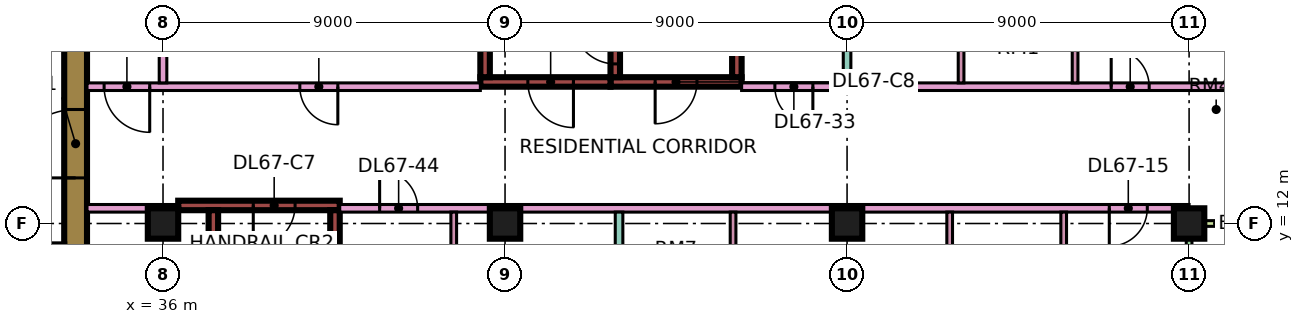
"""IFC4 building model, lengths in metres.
Left out: names, types, materials, properties, quantities, classifications, styles, units other than length and angle.
Written with IfcOpenShell. Run it as: python <this file> out.ifc"""

import sys

from ifc_helpers import new_model, si_unit, direction, frame, frame_2d, origin, origin_2d, place, context, subcontext, project, spatial, rectangle, extrude, element, fill, save


model = new_model("IFC4")
c1 = context("Model", 3, precision=1e-05, world=origin(), true_north=direction((0.0, 1.0)))
c2 = subcontext(c1, "Body", "Model", "MODEL_VIEW")
j1 = project(units=[si_unit("LENGTHUNIT", "METRE"), si_unit("PLANEANGLEUNIT", "RADIAN")], contexts=[c1])
p1 = place(None, origin())
s1 = spatial("IfcSite", under=j1, at=p1, CompositionType="ELEMENT")
p2 = place(p1, origin())
s2 = spatial("IfcBuilding", under=s1, at=p2, CompositionType="ELEMENT")
p3 = place(p2, frame((0.0, 0.0, 288.4)))
s3 = spatial("IfcBuildingStorey", under=s2, at=p3, CompositionType="ELEMENT", Elevation=288.4)
for number, where, z_axis, x_axis in (
    (1, (36.0, 12.0, 0.0), (0.0, 0.0, 1.0), (1.0, 0.0, 0.0)),
    (2, (45.0, 12.0, 0.0), (0.0, 0.0, 1.0), (1.0, 0.0, 0.0)),
    (3, (54.0, 12.0, 0.0), (0.0, 0.0, 1.0), (1.0, 0.0, 0.0)),
    (4, (63.0, 12.0, 0.0), (0.0, 0.0, 1.0), (1.0, 0.0, 0.0)),
):
    element("IfcColumn", number, at=place(p3, frame(where, z_axis=z_axis, x_axis=x_axis)), inside=s3, PredefinedType="COLUMN", context=c2, shape_type="SweptSolid", body=[
        extrude(rectangle(XDim=0.8, YDim=0.8, at=origin_2d()), origin(), (0.0, 0.0, 1.0), 3.75),
    ])
p4 = place(p3, frame((33.7, 7.6, 0.0), z_axis=(0.0, 0.0, 1.0), x_axis=(0.0, 1.0, 0.0)))
e5 = element("IfcWall", 5, at=p4, inside=s3, PredefinedType="SHEAR", context=c2, shape_type="SweptSolid", body=[
    extrude(rectangle(XDim=11.8, YDim=0.6, at=frame_2d((5.9, 0.0))), origin(), (0.0, 0.0, 1.0), 3.75),
])
p5 = place(p4, frame((5.6, 0.0, 0.0)))
e6 = element("IfcOpeningElement", 6, at=p5, cuts=e5, PredefinedType="OPENING", context=c2, shape_type="SweptSolid", body=[
    extrude(rectangle(XDim=1.8, YDim=2.4, at=frame_2d((0.9, 1.2))), frame((0.0, 0.31, 0.0), z_axis=(0.0, -1.0, 0.0), x_axis=(1.0, 0.0, 0.0)), (0.0, 0.0, 1.0), 0.62),
])
p6 = place(p3, frame((36.4, 12.475, 0.0), z_axis=(0.0, 0.0, 1.0), x_axis=(1.0, 0.0, 0.0)))
e7 = element("IfcWall", 7, at=p6, inside=s3, PredefinedType="SHEAR", context=c2, shape_type="SweptSolid", body=[
    extrude(rectangle(XDim=4.25, YDim=0.25, at=frame_2d((2.125, 0.0))), origin(), (0.0, 0.0, 1.0), 3.75),
])
p7 = place(p6, frame((1.975, 0.0, 0.0)))
e8 = element("IfcOpeningElement", 8, at=p7, cuts=e7, PredefinedType="OPENING", context=c2, shape_type="SweptSolid", body=[
    extrude(rectangle(XDim=1.1, YDim=2.2, at=frame_2d((0.55, 1.1))), frame((0.0, 0.135, 0.0), z_axis=(0.0, -1.0, 0.0), x_axis=(1.0, 0.0, 0.0)), (0.0, 0.0, 1.0), 0.27),
])
for number, where, z_axis, x_axis in (
    (9, (37.325, 5.85, 0.0), (0.0, 0.0, 1.0), (0.0, 1.0, 0.0)),
    (10, (40.525, 5.85, 0.0), (0.0, 0.0, 1.0), (0.0, 1.0, 0.0)),
):
    element("IfcWall", number, at=place(p3, frame(where, z_axis=z_axis, x_axis=x_axis)), inside=s3, PredefinedType="SHEAR", context=c2, shape_type="SweptSolid", body=[
        extrude(rectangle(XDim=6.5, YDim=0.25, at=frame_2d((3.25, 0.0))), origin(), (0.0, 0.0, 1.0), 3.75),
    ])
p8 = place(p3, frame((47.775, 15.725, 0.0), z_axis=(0.0, 0.0, 1.0), x_axis=(1.0, 0.0, 0.0)))
e11 = element("IfcWall", 11, at=p8, inside=s3, PredefinedType="SHEAR", context=c2, shape_type="SweptSolid", body=[
    extrude(rectangle(XDim=3.45, YDim=0.25, at=frame_2d((1.725, 0.0))), origin(), (0.0, 0.0, 1.0), 3.75),
])
p9 = place(p8, frame((1.175, 0.0, 0.0)))
e12 = element("IfcOpeningElement", 12, at=p9, cuts=e11, PredefinedType="OPENING", context=c2, shape_type="SweptSolid", body=[
    extrude(rectangle(XDim=1.1, YDim=2.2, at=frame_2d((0.55, 1.1))), frame((0.0, 0.135, 0.0), z_axis=(0.0, -1.0, 0.0), x_axis=(1.0, 0.0, 0.0)), (0.0, 0.0, 1.0), 0.27),
])
p10 = place(p3, frame((47.9, 15.85, 0.0), z_axis=(0.0, 0.0, 1.0), x_axis=(0.0, 1.0, 0.0)))
e13 = element("IfcWall", 13, at=p10, inside=s3, PredefinedType="SHEAR", context=c2, shape_type="SweptSolid", body=[
    extrude(rectangle(XDim=6.5, YDim=0.25, at=frame_2d((3.25, 0.0))), origin(), (0.0, 0.0, 1.0), 3.75),
])
p11 = place(p10, frame((0.35, 0.0, 0.0)))
e14 = element("IfcOpeningElement", 14, at=p11, cuts=e13, PredefinedType="OPENING", context=c2, shape_type="SweptSolid", body=[
    extrude(rectangle(XDim=1.1, YDim=2.2, at=frame_2d((0.55, 1.1))), frame((0.0, 0.135, 0.0), z_axis=(0.0, -1.0, 0.0), x_axis=(1.0, 0.0, 0.0)), (0.0, 0.0, 1.0), 0.27),
])
p12 = place(p3, frame((51.1, 15.85, 0.0), z_axis=(0.0, 0.0, 1.0), x_axis=(0.0, 1.0, 0.0)))
e15 = element("IfcWall", 15, at=p12, inside=s3, PredefinedType="SHEAR", context=c2, shape_type="SweptSolid", body=[
    extrude(rectangle(XDim=6.5, YDim=0.25, at=frame_2d((3.25, 0.0))), origin(), (0.0, 0.0, 1.0), 3.75),
])
p13 = place(p3, frame((44.35, 15.725, 0.0), z_axis=(0.0, 0.0, 1.0), x_axis=(1.0, 0.0, 0.0)))
e16 = element("IfcWall", 16, at=p13, inside=s3, PredefinedType="SHEAR", context=c2, shape_type="SweptSolid", body=[
    extrude(rectangle(XDim=3.425, YDim=0.25, at=frame_2d((1.712, 0.0))), origin(), (0.0, 0.0, 1.0), 3.75),
])
p14 = place(p13, frame((1.25, 0.0, 0.0)))
e17 = element("IfcOpeningElement", 17, at=p14, cuts=e16, PredefinedType="OPENING", context=c2, shape_type="SweptSolid", body=[
    extrude(rectangle(XDim=1.2, YDim=2.2, at=frame_2d((0.6, 1.1))), frame((0.0, 0.135, 0.0), z_axis=(0.0, -1.0, 0.0), x_axis=(1.0, 0.0, 0.0)), (0.0, 0.0, 1.0), 0.27),
])
p15 = place(p3, frame((44.475, 15.85, 0.0), z_axis=(0.0, 0.0, 1.0), x_axis=(0.0, 1.0, 0.0)))
e18 = element("IfcWall", 18, at=p15, inside=s3, PredefinedType="SHEAR", context=c2, shape_type="SweptSolid", body=[
    extrude(rectangle(XDim=6.5, YDim=0.25, at=frame_2d((3.25, 0.0))), origin(), (0.0, 0.0, 1.0), 3.75),
])
p16 = place(p15, frame((1.75, 0.0, 0.0)))
e19 = element("IfcOpeningElement", 19, at=p16, cuts=e18, PredefinedType="OPENING", context=c2, shape_type="SweptSolid", body=[
    extrude(rectangle(XDim=1.1, YDim=2.2, at=frame_2d((0.55, 1.1))), frame((0.0, 0.135, 0.0), z_axis=(0.0, -1.0, 0.0), x_axis=(1.0, 0.0, 0.0)), (0.0, 0.0, 1.0), 0.27),
])
p17 = place(p15, frame((4.3, 0.0, 0.0)))
e20 = element("IfcOpeningElement", 20, at=p17, cuts=e18, PredefinedType="OPENING", context=c2, shape_type="SweptSolid", body=[
    extrude(rectangle(XDim=1.1, YDim=2.2, at=frame_2d((0.55, 1.1))), frame((0.0, 0.135, 0.0), z_axis=(0.0, -1.0, 0.0), x_axis=(1.0, 0.0, 0.0)), (0.0, 0.0, 1.0), 0.27),
])
p18 = place(p3, frame((63.0, 1.575, 0.0), z_axis=(0.0, 0.0, 1.0), x_axis=(0.0, 1.0, 0.0)))
e21 = element("IfcWall", 21, at=p18, inside=s3, PredefinedType="SOLIDWALL", context=c2, shape_type="SweptSolid", body=[
    extrude(rectangle(XDim=10.35, YDim=0.15, at=frame_2d((5.175, 0.0))), origin(), (0.0, 0.0, 1.0), 3.35),
])
p19 = place(p18, frame((1.812, 0.0, 0.0)))
e22 = element("IfcOpeningElement", 22, at=p19, cuts=e21, PredefinedType="OPENING", context=c2, shape_type="SweptSolid", body=[
    extrude(rectangle(XDim=1.8, YDim=2.4, at=frame_2d((0.9, 1.2))), frame((0.0, 0.085, 0.0), z_axis=(0.0, -1.0, 0.0), x_axis=(1.0, 0.0, 0.0)), (0.0, 0.0, 1.0), 0.17),
])
p20 = place(p18, frame((6.175, 0.0, 0.45)))
e23 = element("IfcOpeningElement", 23, at=p20, cuts=e21, PredefinedType="OPENING", context=c2, shape_type="SweptSolid", body=[
    extrude(rectangle(XDim=3.0, YDim=2.4, at=frame_2d((1.5, 1.2))), frame((0.0, 0.085, 0.0), z_axis=(0.0, -1.0, 0.0), x_axis=(1.0, 0.0, 0.0)), (0.0, 0.0, 1.0), 0.17),
])
p21 = place(p3, frame((64.5, 12.0, 0.0), z_axis=(0.0, 0.0, 1.0), x_axis=(-1.0, 0.0, 0.0)))
e24 = element("IfcWall", 24, at=p21, inside=s3, PredefinedType="SOLIDWALL", context=c2, shape_type="SweptSolid", body=[
    extrude(rectangle(XDim=1.5, YDim=0.15, at=frame_2d((0.75, 0.0))), origin(), (0.0, 0.0, 1.0), 3.35),
])
p22 = place(p3, frame((34.0, 12.4, 0.0), z_axis=(0.0, 0.0, 1.0), x_axis=(1.0, 0.0, 0.0)))
e25 = element("IfcWall", 25, at=p22, inside=s3, PredefinedType="PARTITIONING", context=c2, shape_type="SweptSolid", body=[
    extrude(rectangle(XDim=2.401, YDim=0.2, at=frame_2d((1.2, 0.0))), origin(), (0.0, 0.0, 1.0), 3.35),
])
p23 = place(p3, frame((34.0, 15.6, 0.0), z_axis=(0.0, 0.0, 1.0), x_axis=(1.0, 0.0, 0.0)))
e26 = element("IfcWall", 26, at=p23, inside=s3, PredefinedType="PARTITIONING", context=c2, shape_type="SweptSolid", body=[
    extrude(rectangle(XDim=10.35, YDim=0.2, at=frame_2d((5.175, 0.0))), origin(), (0.0, 0.0, 1.0), 3.35),
])
p24 = place(p23, frame((5.6, 0.0, 0.0)))
e27 = element("IfcOpeningElement", 27, at=p24, cuts=e26, PredefinedType="OPENING", context=c2, shape_type="SweptSolid", body=[
    extrude(rectangle(XDim=1.0, YDim=2.1, at=frame_2d((0.5, 1.05))), frame((0.0, 0.11, 0.0), z_axis=(0.0, -1.0, 0.0), x_axis=(1.0, 0.0, 0.0)), (0.0, 0.0, 1.0), 0.22),
])
p25 = place(p23, frame((0.45, 0.0, 0.0)))
e28 = element("IfcOpeningElement", 28, at=p25, cuts=e26, PredefinedType="OPENING", context=c2, shape_type="SweptSolid", body=[
    extrude(rectangle(XDim=1.2, YDim=2.1, at=frame_2d((0.6, 1.05))), frame((0.0, 0.11, 0.0), z_axis=(0.0, -1.0, 0.0), x_axis=(1.0, 0.0, 0.0)), (0.0, 0.0, 1.0), 0.22),
])
p26 = place(p3, frame((36.0, 15.7, 0.0), z_axis=(0.0, 0.0, 1.0), x_axis=(0.0, 1.0, 0.0)))
e29 = element("IfcWall", 29, at=p26, inside=s3, PredefinedType="PARTITIONING", context=c2, shape_type="SweptSolid", body=[
    extrude(rectangle(XDim=8.3, YDim=0.2, at=frame_2d((4.15, 0.0))), origin(), (0.0, 0.0, 1.0), 3.35),
])
p27 = place(p3, frame((40.65, 12.4, 0.0), z_axis=(0.0, 0.0, 1.0), x_axis=(1.0, 0.0, 0.0)))
e30 = element("IfcWall", 30, at=p27, inside=s3, PredefinedType="PARTITIONING", context=c2, shape_type="SweptSolid", body=[
    extrude(rectangle(XDim=22.35, YDim=0.2, at=frame_2d((11.175, 0.0))), origin(), (0.0, 0.0, 1.0), 3.35),
])
p28 = place(p27, frame((20.25, 0.0, 0.0)))
e31 = element("IfcOpeningElement", 31, at=p28, cuts=e30, PredefinedType="OPENING", context=c2, shape_type="SweptSolid", body=[
    extrude(rectangle(XDim=1.0, YDim=2.1, at=frame_2d((0.5, 1.05))), frame((0.0, 0.11, 0.0), z_axis=(0.0, -1.0, 0.0), x_axis=(1.0, 0.0, 0.0)), (0.0, 0.0, 1.0), 0.22),
])
p29 = place(p27, frame((1.05, 0.0, 0.0)))
e32 = element("IfcOpeningElement", 32, at=p29, cuts=e30, PredefinedType="OPENING", context=c2, shape_type="SweptSolid", body=[
    extrude(rectangle(XDim=1.0, YDim=2.1, at=frame_2d((0.5, 1.05))), frame((0.0, 0.11, 0.0), z_axis=(0.0, -1.0, 0.0), x_axis=(1.0, 0.0, 0.0)), (0.0, 0.0, 1.0), 0.22),
])
p30 = place(p3, frame((43.65, 5.825, 0.0), z_axis=(0.0, 0.0, 1.0), x_axis=(0.0, 1.0, 0.0)))
e33 = element("IfcWall", 33, at=p30, inside=s3, PredefinedType="PARTITIONING", context=c2, shape_type="SweptSolid", body=[
    extrude(rectangle(XDim=6.475, YDim=0.15, at=frame_2d((3.238, 0.0))), origin(), (0.0, 0.0, 1.0), 3.35),
])
p31 = place(p30, frame((4.425, 0.0, 0.0)))
e34 = element("IfcOpeningElement", 34, at=p31, cuts=e33, PredefinedType="OPENING", context=c2, shape_type="SweptSolid", body=[
    extrude(rectangle(XDim=0.9, YDim=2.1, at=frame_2d((0.45, 1.05))), frame((0.0, 0.085, 0.0), z_axis=(0.0, -1.0, 0.0), x_axis=(1.0, 0.0, 0.0)), (0.0, 0.0, 1.0), 0.17),
])
p32 = place(p3, frame((48.0, 0.0, 0.0), z_axis=(0.0, 0.0, 1.0), x_axis=(0.0, 1.0, 0.0)))
e35 = element("IfcWall", 35, at=p32, inside=s3, PredefinedType="PARTITIONING", context=c2, shape_type="SweptSolid", body=[
    extrude(rectangle(XDim=12.3, YDim=0.2, at=frame_2d((6.15, 0.0))), origin(), (0.0, 0.0, 1.0), 3.35),
])
p33 = place(p3, frame((51.0, 8.275, 0.0), z_axis=(0.0, 0.0, 1.0), x_axis=(0.0, 1.0, 0.0)))
e36 = element("IfcWall", 36, at=p33, inside=s3, PredefinedType="PARTITIONING", context=c2, shape_type="SweptSolid", body=[
    extrude(rectangle(XDim=4.025, YDim=0.15, at=frame_2d((2.013, 0.0))), origin(), (0.0, 0.0, 1.0), 3.35),
])
p34 = place(p3, frame((51.225, 15.6, 0.0), z_axis=(0.0, 0.0, 1.0), x_axis=(1.0, 0.0, 0.0)))
e37 = element("IfcWall", 37, at=p34, inside=s3, PredefinedType="PARTITIONING", context=c2, shape_type="SweptSolid", body=[
    extrude(rectangle(XDim=13.125, YDim=0.2, at=frame_2d((6.562, 0.0))), origin(), (0.0, 0.0, 1.0), 3.35),
])
p35 = place(p34, frame((9.725, 0.0, 0.0)))
e38 = element("IfcOpeningElement", 38, at=p35, cuts=e37, PredefinedType="OPENING", context=c2, shape_type="SweptSolid", body=[
    extrude(rectangle(XDim=1.0, YDim=2.1, at=frame_2d((0.5, 1.05))), frame((0.0, 0.11, 0.0), z_axis=(0.0, -1.0, 0.0), x_axis=(1.0, 0.0, 0.0)), (0.0, 0.0, 1.0), 0.22),
])
p36 = place(p34, frame((0.875, 0.0, 0.0)))
e39 = element("IfcOpeningElement", 39, at=p36, cuts=e37, PredefinedType="OPENING", context=c2, shape_type="SweptSolid", body=[
    extrude(rectangle(XDim=1.0, YDim=2.1, at=frame_2d((0.5, 1.05))), frame((0.0, 0.11, 0.0), z_axis=(0.0, -1.0, 0.0), x_axis=(1.0, 0.0, 0.0)), (0.0, 0.0, 1.0), 0.22),
])
p37 = place(p3, frame((54.0, 15.7, 0.0), z_axis=(0.0, 0.0, 1.0), x_axis=(0.0, 1.0, 0.0)))
e40 = element("IfcWall", 40, at=p37, inside=s3, PredefinedType="PARTITIONING", context=c2, shape_type="SweptSolid", body=[
    extrude(rectangle(XDim=8.226, YDim=0.2, at=frame_2d((4.113, 0.0))), origin(), (0.0, 0.0, 1.0), 3.35),
])
p38 = place(p3, frame((56.7, 8.275, 0.0), z_axis=(0.0, 0.0, 1.0), x_axis=(0.0, 1.0, 0.0)))
e41 = element("IfcWall", 41, at=p38, inside=s3, PredefinedType="PARTITIONING", context=c2, shape_type="SweptSolid", body=[
    extrude(rectangle(XDim=4.025, YDim=0.15, at=frame_2d((2.013, 0.0))), origin(), (0.0, 0.0, 1.0), 3.35),
])
p39 = place(p3, frame((57.0, 15.7, 0.0), z_axis=(0.0, 0.0, 1.0), x_axis=(0.0, 1.0, 0.0)))
e42 = element("IfcWall", 42, at=p39, inside=s3, PredefinedType="PARTITIONING", context=c2, shape_type="SweptSolid", body=[
    extrude(rectangle(XDim=2.825, YDim=0.15, at=frame_2d((1.413, 0.0))), origin(), (0.0, 0.0, 1.0), 3.35),
])
p40 = place(p3, frame((59.7, 8.275, 0.0), z_axis=(0.0, 0.0, 1.0), x_axis=(0.0, 1.0, 0.0)))
e43 = element("IfcWall", 43, at=p40, inside=s3, PredefinedType="PARTITIONING", context=c2, shape_type="SweptSolid", body=[
    extrude(rectangle(XDim=4.025, YDim=0.15, at=frame_2d((2.013, 0.0))), origin(), (0.0, 0.0, 1.0), 3.35),
])
p41 = place(p3, frame((60.0, 15.7, 0.0), z_axis=(0.0, 0.0, 1.0), x_axis=(0.0, 1.0, 0.0)))
e44 = element("IfcWall", 44, at=p41, inside=s3, PredefinedType="PARTITIONING", context=c2, shape_type="SweptSolid", body=[
    extrude(rectangle(XDim=2.825, YDim=0.15, at=frame_2d((1.413, 0.0))), origin(), (0.0, 0.0, 1.0), 3.35),
])
p42 = place(p5, origin())
e45 = element("IfcDoor", 45, at=p42, inside=s3, OperationType="DOUBLE_DOOR_SINGLE_SWING", PredefinedType="DOOR", context=c2, shape_type="SweptSolid", body=[
    extrude(rectangle(XDim=1.8, YDim=2.4, at=frame_2d((0.9, 1.2))), frame((0.0, 0.025, 0.0), z_axis=(0.0, -1.0, 0.0), x_axis=(1.0, 0.0, 0.0)), (0.0, 0.0, 1.0), 0.05),
])
fill(e6, e45)
p43 = place(p7, frame((1.1, 0.0, 0.0), z_axis=(0.0, 0.0, 1.0), x_axis=(-1.0, 0.0, 0.0)))
e46 = element("IfcDoor", 46, at=p43, inside=s3, OperationType="SINGLE_SWING_LEFT", PredefinedType="DOOR", context=c2, shape_type="SweptSolid", body=[
    extrude(rectangle(XDim=1.1, YDim=2.2, at=frame_2d((0.55, 1.1))), frame((0.0, 0.025, 0.0), z_axis=(0.0, -1.0, 0.0), x_axis=(1.0, 0.0, 0.0)), (0.0, 0.0, 1.0), 0.05),
])
fill(e8, e46)
p44 = place(p9, frame((1.1, 0.0, 0.0), z_axis=(0.0, 0.0, 1.0), x_axis=(-1.0, 0.0, 0.0)))
e47 = element("IfcDoor", 47, at=p44, inside=s3, OperationType="SINGLE_SWING_LEFT", PredefinedType="DOOR", context=c2, shape_type="SweptSolid", body=[
    extrude(rectangle(XDim=1.1, YDim=2.2, at=frame_2d((0.55, 1.1))), frame((0.0, 0.025, 0.0), z_axis=(0.0, -1.0, 0.0), x_axis=(1.0, 0.0, 0.0)), (0.0, 0.0, 1.0), 0.05),
])
fill(e12, e47)
p45 = place(p14, origin())
e48 = element("IfcDoor", 48, at=p45, inside=s3, OperationType="SINGLE_SWING_RIGHT", PredefinedType="DOOR", context=c2, shape_type="SweptSolid", body=[
    extrude(rectangle(XDim=1.2, YDim=2.2, at=frame_2d((0.6, 1.1))), frame((0.0, 0.025, 0.0), z_axis=(0.0, -1.0, 0.0), x_axis=(1.0, 0.0, 0.0)), (0.0, 0.0, 1.0), 0.05),
])
fill(e17, e48)
p46 = place(p11, frame((1.1, 0.0, 0.0), z_axis=(0.0, 0.0, 1.0), x_axis=(-1.0, 0.0, 0.0)))
e49 = element("IfcDoor", 49, at=p46, inside=s3, OperationType="SINGLE_SWING_RIGHT", PredefinedType="DOOR", context=c2, shape_type="SweptSolid", body=[
    extrude(rectangle(XDim=1.1, YDim=2.2, at=frame_2d((0.55, 1.1))), frame((0.0, 0.025, 0.0), z_axis=(0.0, -1.0, 0.0), x_axis=(1.0, 0.0, 0.0)), (0.0, 0.0, 1.0), 0.05),
])
fill(e14, e49)
p47 = place(p24, origin())
e50 = element("IfcDoor", 50, at=p47, inside=s3, OperationType="SINGLE_SWING_RIGHT", PredefinedType="DOOR", context=c2, shape_type="SweptSolid", body=[
    extrude(rectangle(XDim=1.0, YDim=2.1, at=frame_2d((0.5, 1.05))), frame((0.0, 0.025, 0.0), z_axis=(0.0, -1.0, 0.0), x_axis=(1.0, 0.0, 0.0)), (0.0, 0.0, 1.0), 0.05),
])
fill(e27, e50)
p48 = place(p35, origin())
e51 = element("IfcDoor", 51, at=p48, inside=s3, OperationType="SINGLE_SWING_LEFT", PredefinedType="DOOR", context=c2, shape_type="SweptSolid", body=[
    extrude(rectangle(XDim=1.0, YDim=2.1, at=frame_2d((0.5, 1.05))), frame((0.0, 0.025, 0.0), z_axis=(0.0, -1.0, 0.0), x_axis=(1.0, 0.0, 0.0)), (0.0, 0.0, 1.0), 0.05),
])
fill(e38, e51)
p49 = place(p28, frame((1.0, 0.0, 0.0), z_axis=(0.0, 0.0, 1.0), x_axis=(-1.0, 0.0, 0.0)))
e52 = element("IfcDoor", 52, at=p49, inside=s3, OperationType="SINGLE_SWING_LEFT", PredefinedType="DOOR", context=c2, shape_type="SweptSolid", body=[
    extrude(rectangle(XDim=1.0, YDim=2.1, at=frame_2d((0.5, 1.05))), frame((0.0, 0.025, 0.0), z_axis=(0.0, -1.0, 0.0), x_axis=(1.0, 0.0, 0.0)), (0.0, 0.0, 1.0), 0.05),
])
fill(e31, e52)
p50 = place(p25, origin())
e53 = element("IfcDoor", 53, at=p50, inside=s3, OperationType="SINGLE_SWING_RIGHT", PredefinedType="DOOR", context=c2, shape_type="SweptSolid", body=[
    extrude(rectangle(XDim=1.2, YDim=2.1, at=frame_2d((0.6, 1.05))), frame((0.0, 0.025, 0.0), z_axis=(0.0, -1.0, 0.0), x_axis=(1.0, 0.0, 0.0)), (0.0, 0.0, 1.0), 0.05),
])
fill(e28, e53)
p51 = place(p36, origin())
e54 = element("IfcDoor", 54, at=p51, inside=s3, OperationType="SINGLE_SWING_RIGHT", PredefinedType="DOOR", context=c2, shape_type="SweptSolid", body=[
    extrude(rectangle(XDim=1.0, YDim=2.1, at=frame_2d((0.5, 1.05))), frame((0.0, 0.025, 0.0), z_axis=(0.0, -1.0, 0.0), x_axis=(1.0, 0.0, 0.0)), (0.0, 0.0, 1.0), 0.05),
])
fill(e39, e54)
p52 = place(p29, origin())
e55 = element("IfcDoor", 55, at=p52, inside=s3, OperationType="SINGLE_SWING_LEFT", PredefinedType="DOOR", context=c2, shape_type="SweptSolid", body=[
    extrude(rectangle(XDim=1.0, YDim=2.1, at=frame_2d((0.5, 1.05))), frame((0.0, 0.025, 0.0), z_axis=(0.0, -1.0, 0.0), x_axis=(1.0, 0.0, 0.0)), (0.0, 0.0, 1.0), 0.05),
])
fill(e32, e55)
save(model, sys.argv[1])
